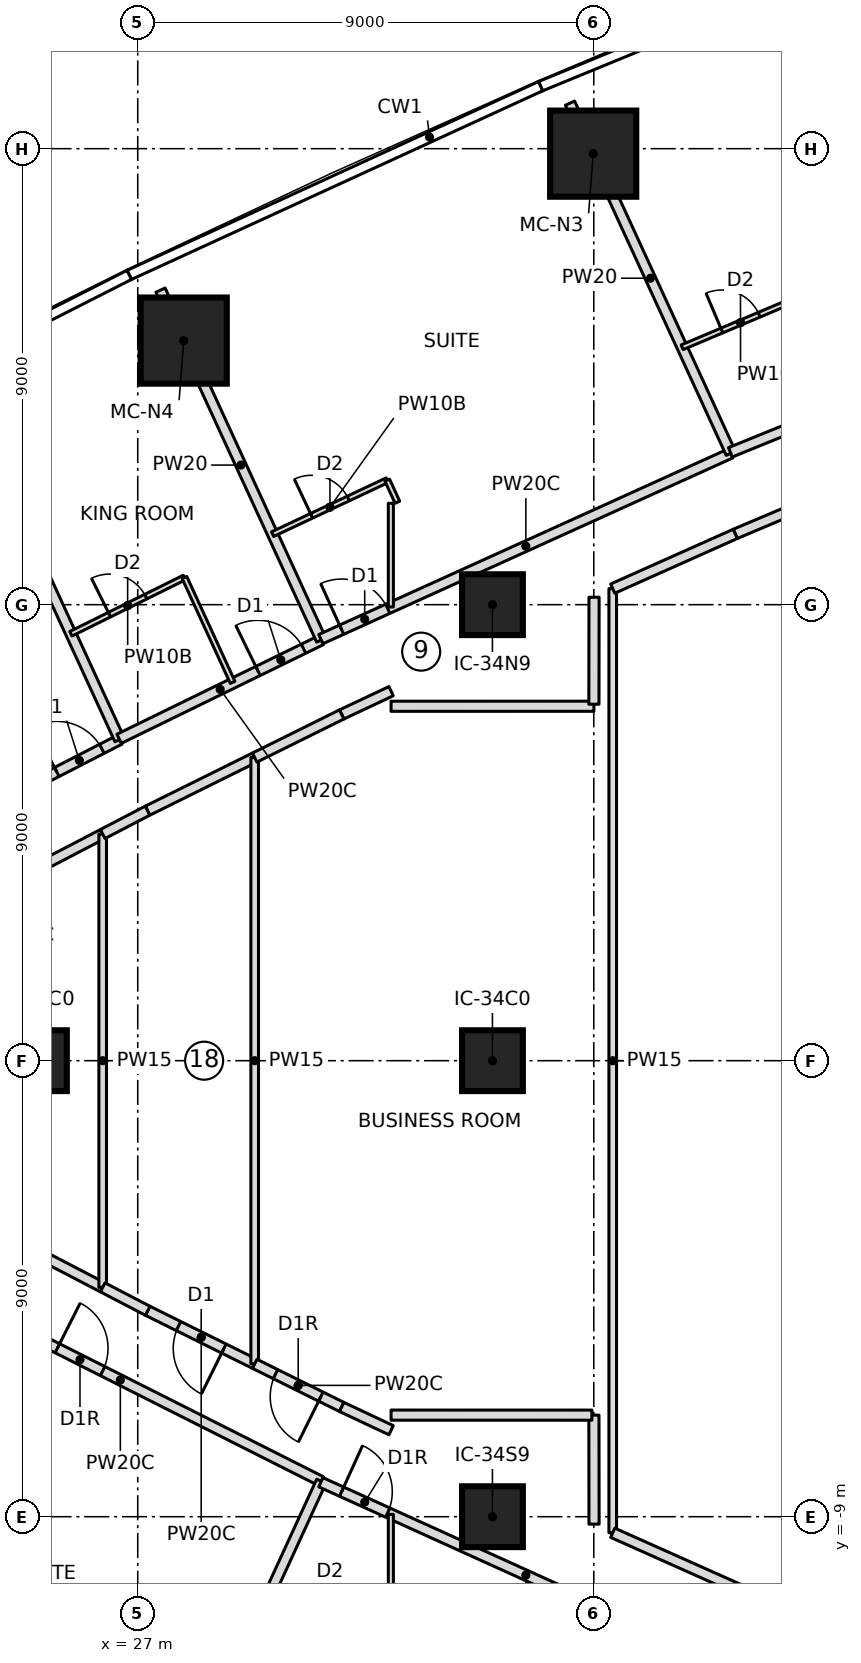
"""IFC4 building model, lengths in metres.
Left out: names, types, materials, properties, quantities, classifications, styles, units other than length and angle.
Written with IfcOpenShell. Run it as: python <this file> out.ifc"""

import sys

from ifc_helpers import new_model, si_unit, direction, frame, frame_2d, origin, origin_2d, place, context, subcontext, project, spatial, rectangle, extrude, element, fill, save


model = new_model("IFC4")
c1 = context("Model", 3, precision=1e-05, world=origin(), true_north=direction((0.0, 1.0)))
c2 = subcontext(c1, "Body", "Model", "MODEL_VIEW")
j1 = project(units=[si_unit("LENGTHUNIT", "METRE"), si_unit("PLANEANGLEUNIT", "RADIAN")], contexts=[c1])
p1 = place(None, origin())
s1 = spatial("IfcSite", under=j1, at=p1, CompositionType="ELEMENT")
p2 = place(p1, origin())
s2 = spatial("IfcBuilding", under=s1, at=p2, CompositionType="ELEMENT")
p3 = place(p2, frame((0.0, 0.0, 113.3)))
s3 = spatial("IfcBuildingStorey", under=s2, at=p3, CompositionType="ELEMENT", Elevation=113.3)
for number, where, z_axis, x_axis in (
    (1, (35.988, 17.902, 0.0), (0.0, 0.0, 1.0), (1.0, 0.0, 0.0)),
    (2, (27.907, 14.212, 0.0), (0.0, 0.0, 1.0), (1.0, 0.0, 0.0)),
):
    element("IfcColumn", number, at=place(p3, frame(where, z_axis=z_axis, x_axis=x_axis)), inside=s3, PredefinedType="COLUMN", context=c2, shape_type="SweptSolid", body=[
        extrude(rectangle(XDim=1.7, YDim=1.7, at=origin_2d()), origin(), (0.0, 0.0, 1.0), 3.55),
    ])
for number, where, z_axis, x_axis in (
    (3, (25.0, 0.0, 0.0), (0.0, 0.0, 1.0), (1.0, 0.0, 0.0)),
    (4, (34.0, -9.0, 0.0), (0.0, 0.0, 1.0), (1.0, 0.0, 0.0)),
    (5, (34.0, 0.0, 0.0), (0.0, 0.0, 1.0), (1.0, 0.0, 0.0)),
    (6, (34.0, 9.0, 0.0), (0.0, 0.0, 1.0), (1.0, 0.0, 0.0)),
):
    element("IfcColumn", number, at=place(p3, frame(where, z_axis=z_axis, x_axis=x_axis)), inside=s3, PredefinedType="COLUMN", context=c2, shape_type="SweptSolid", body=[
        extrude(rectangle(XDim=1.2, YDim=1.2, at=origin_2d()), origin(), (0.0, 0.0, 1.0), 3.55),
    ])
p4 = place(p3, frame((22.69, 4.302, 0.0), z_axis=(0.0, 0.0, 1.0), x_axis=(0.889236075961, 0.457448577667, 0.0)))
e7 = element("IfcWall", 7, at=p4, inside=s3, PredefinedType="PARTITIONING", context=c2, shape_type="SweptSolid", body=[
    extrude(rectangle(XDim=4.443, YDim=0.2, at=frame_2d((2.222, 0.0))), origin(), (0.0, 0.0, 1.0), 3.25),
])
p5 = place(p4, frame((3.05, 0.0, 0.0)))
e8 = element("IfcOpeningElement", 8, at=p5, cuts=e7, PredefinedType="OPENING", context=c2, shape_type="SweptSolid", body=[
    extrude(rectangle(XDim=1.0, YDim=2.1, at=frame_2d((0.5, 1.05))), frame((0.0, 0.11, 0.0), z_axis=(0.0, -1.0, 0.0), x_axis=(1.0, 0.0, 0.0)), (0.0, 0.0, 1.0), 0.22),
])
p6 = place(p3, frame((26.641, 6.335, 0.0), z_axis=(0.0, 0.0, 1.0), x_axis=(-0.417455028008, 0.908697584233, 0.0)))
e9 = element("IfcWall", 9, at=p6, inside=s3, PredefinedType="PARTITIONING", context=c2, shape_type="SweptSolid", body=[
    extrude(rectangle(XDim=7.603, YDim=0.2, at=frame_2d((3.802, 0.0))), origin(), (0.0, 0.0, 1.0), 3.25),
])
p7 = place(p3, frame((26.633, 6.353, 0.0), z_axis=(0.0, 0.0, 1.0), x_axis=(0.898502457097, 0.438968489291, 0.0)))
e10 = element("IfcWall", 10, at=p7, inside=s3, PredefinedType="PARTITIONING", context=c2, shape_type="SweptSolid", body=[
    extrude(rectangle(XDim=4.44, YDim=0.2, at=frame_2d((2.22, 0.0))), origin(), (0.0, 0.0, 1.0), 3.25),
])
p8 = place(p7, frame((3.05, 0.0, 0.0)))
e11 = element("IfcOpeningElement", 11, at=p8, cuts=e10, PredefinedType="OPENING", context=c2, shape_type="SweptSolid", body=[
    extrude(rectangle(XDim=1.0, YDim=2.1, at=frame_2d((0.5, 1.05))), frame((0.0, 0.11, 0.0), z_axis=(0.0, -1.0, 0.0), x_axis=(1.0, 0.0, 0.0)), (0.0, 0.0, 1.0), 0.22),
])
p9 = place(p3, frame((25.681, 8.426, 0.0), z_axis=(0.0, 0.0, 1.0), x_axis=(0.895944857815, 0.444165297784, 0.0)))
e12 = element("IfcWall", 12, at=p9, inside=s3, PredefinedType="PARTITIONING", context=c2, shape_type="SweptSolid", body=[
    extrude(rectangle(XDim=2.501, YDim=0.1, at=frame_2d((1.25, 0.0))), origin(), (0.0, 0.0, 1.0), 3.25),
])
p10 = place(p9, frame((0.85, 0.0, 0.0)))
e13 = element("IfcOpeningElement", 13, at=p10, cuts=e12, PredefinedType="OPENING", context=c2, shape_type="SweptSolid", body=[
    extrude(rectangle(XDim=0.8, YDim=2.1, at=frame_2d((0.4, 1.05))), frame((0.0, 0.06, 0.0), z_axis=(0.0, -1.0, 0.0), x_axis=(1.0, 0.0, 0.0)), (0.0, 0.0, 1.0), 0.12),
])
p11 = place(p3, frame((27.922, 9.537, 0.0), z_axis=(0.0, 0.0, 1.0), x_axis=(0.417433204355, -0.908707609686, 0.0)))
e14 = element("IfcWall", 14, at=p11, inside=s3, PredefinedType="PARTITIONING", context=c2, shape_type="SweptSolid", body=[
    extrude(rectangle(XDim=2.278, YDim=0.1, at=frame_2d((1.139, 0.0))), origin(), (0.0, 0.0, 1.0), 3.25),
])
p12 = place(p3, frame((30.622, 8.302, 0.0), z_axis=(0.0, 0.0, 1.0), x_axis=(-0.417429919618, 0.90870911859, 0.0)))
e15 = element("IfcWall", 15, at=p12, inside=s3, PredefinedType="PARTITIONING", context=c2, shape_type="SweptSolid", body=[
    extrude(rectangle(XDim=7.6, YDim=0.2, at=frame_2d((3.8, 0.0))), origin(), (0.0, 0.0, 1.0), 3.25),
])
p13 = place(p3, frame((30.614, 8.32, 0.0), z_axis=(0.0, 0.0, 1.0), x_axis=(0.910751030363, 0.41295588226, 0.0)))
e16 = element("IfcWall", 16, at=p13, inside=s3, PredefinedType="PARTITIONING", context=c2, shape_type="SweptSolid", body=[
    extrude(rectangle(XDim=8.883, YDim=0.2, at=frame_2d((4.442, 0.0))), origin(), (0.0, 0.0, 1.0), 3.25),
])
p14 = place(p13, frame((0.45, 0.0, 0.0)))
e17 = element("IfcOpeningElement", 17, at=p14, cuts=e16, PredefinedType="OPENING", context=c2, shape_type="SweptSolid", body=[
    extrude(rectangle(XDim=1.0, YDim=2.1, at=frame_2d((0.5, 1.05))), frame((0.0, 0.11, 0.0), z_axis=(0.0, -1.0, 0.0), x_axis=(1.0, 0.0, 0.0)), (0.0, 0.0, 1.0), 0.22),
])
p15 = place(p3, frame((29.662, 10.392, 0.0), z_axis=(0.0, 0.0, 1.0), x_axis=(0.904688082375, 0.426074493027, 0.0)))
e18 = element("IfcWall", 18, at=p15, inside=s3, PredefinedType="PARTITIONING", context=c2, shape_type="SweptSolid", body=[
    extrude(rectangle(XDim=2.5, YDim=0.1, at=frame_2d((1.25, 0.0))), origin(), (0.0, 0.0, 1.0), 3.25),
])
p16 = place(p15, frame((0.85, 0.0, 0.0)))
e19 = element("IfcOpeningElement", 19, at=p16, cuts=e18, PredefinedType="OPENING", context=c2, shape_type="SweptSolid", body=[
    extrude(rectangle(XDim=0.8, YDim=2.1, at=frame_2d((0.4, 1.05))), frame((0.0, 0.06, 0.0), z_axis=(0.0, -1.0, 0.0), x_axis=(1.0, 0.0, 0.0)), (0.0, 0.0, 1.0), 0.12),
])
p17 = place(p3, frame((31.924, 11.457, 0.0), z_axis=(0.0, 0.0, 1.0), x_axis=(0.4176025781, -0.908629785316, 0.0)))
e20 = element("IfcWall", 20, at=p17, inside=s3, PredefinedType="PARTITIONING", context=c2, shape_type="SweptSolid", body=[
    extrude(rectangle(XDim=0.479, YDim=0.1, at=frame_2d((0.239, 0.0))), origin(), (0.0, 0.0, 1.0), 3.25),
])
p18 = place(p3, frame((38.704, 11.989, 0.0), z_axis=(0.0, 0.0, 1.0), x_axis=(-0.417416334044, 0.908715359215, 0.0)))
e21 = element("IfcWall", 21, at=p18, inside=s3, PredefinedType="PARTITIONING", context=c2, shape_type="SweptSolid", body=[
    extrude(rectangle(XDim=7.604, YDim=0.2, at=frame_2d((3.802, 0.0))), origin(), (0.0, 0.0, 1.0), 3.25),
])
p19 = place(p3, frame((46.924, 15.357, 0.0), z_axis=(0.0, 0.0, 1.0), x_axis=(-0.926186929429, -0.377064678477, 0.0)))
e22 = element("IfcWall", 22, at=p19, inside=s3, PredefinedType="PARTITIONING", context=c2, shape_type="SweptSolid", body=[
    extrude(rectangle(XDim=8.884, YDim=0.2, at=frame_2d((4.442, 0.0))), origin(), (0.0, 0.0, 1.0), 3.25),
])
p20 = place(p19, frame((0.35, 0.0, 0.0)))
e23 = element("IfcOpeningElement", 23, at=p20, cuts=e22, PredefinedType="OPENING", context=c2, shape_type="SweptSolid", body=[
    extrude(rectangle(XDim=1.0, YDim=2.1, at=frame_2d((0.5, 1.05))), frame((0.0, 0.11, 0.0), z_axis=(0.0, -1.0, 0.0), x_axis=(1.0, 0.0, 0.0)), (0.0, 0.0, 1.0), 0.22),
])
p21 = place(p3, frame((37.744, 14.08, 0.0), z_axis=(0.0, 0.0, 1.0), x_axis=(0.921042675983, 0.38946166566, 0.0)))
e24 = element("IfcWall", 24, at=p21, inside=s3, PredefinedType="PARTITIONING", context=c2, shape_type="SweptSolid", body=[
    extrude(rectangle(XDim=2.501, YDim=0.1, at=frame_2d((1.25, 0.0))), origin(), (0.0, 0.0, 1.0), 3.25),
])
p22 = place(p21, frame((0.85, 0.0, 0.0)))
e25 = element("IfcOpeningElement", 25, at=p22, cuts=e24, PredefinedType="OPENING", context=c2, shape_type="SweptSolid", body=[
    extrude(rectangle(XDim=0.8, YDim=2.1, at=frame_2d((0.4, 1.05))), frame((0.0, 0.06, 0.0), z_axis=(0.0, -1.0, 0.0), x_axis=(1.0, 0.0, 0.0)), (0.0, 0.0, 1.0), 0.12),
])
p23 = place(p3, frame((22.69, -4.302, 0.0), z_axis=(0.0, 0.0, 1.0), x_axis=(0.892904919467, -0.450245271815, 0.0)))
e26 = element("IfcWall", 26, at=p23, inside=s3, PredefinedType="PARTITIONING", context=c2, shape_type="SweptSolid", body=[
    extrude(rectangle(XDim=8.883, YDim=0.2, at=frame_2d((4.441, 0.0))), origin(), (0.0, 0.0, 1.0), 3.25),
])
p24 = place(p23, frame((3.05, 0.0, 0.0)))
e27 = element("IfcOpeningElement", 27, at=p24, cuts=e26, PredefinedType="OPENING", context=c2, shape_type="SweptSolid", body=[
    extrude(rectangle(XDim=1.0, YDim=2.1, at=frame_2d((0.5, 1.05))), frame((0.0, 0.11, 0.0), z_axis=(0.0, -1.0, 0.0), x_axis=(1.0, 0.0, 0.0)), (0.0, 0.0, 1.0), 0.22),
])
p25 = place(p3, frame((27.449, -15.208, 0.0), z_axis=(0.0, 0.0, 1.0), x_axis=(0.417429919618, 0.90870911859, 0.0)))
e28 = element("IfcWall", 28, at=p25, inside=s3, PredefinedType="PARTITIONING", context=c2, shape_type="SweptSolid", body=[
    extrude(rectangle(XDim=7.6, YDim=0.2, at=frame_2d((3.8, 0.0))), origin(), (0.0, 0.0, 1.0), 3.25),
])
p26 = place(p3, frame((30.614, -8.32, 0.0), z_axis=(0.0, 0.0, 1.0), x_axis=(0.910751030363, -0.41295588226, 0.0)))
e29 = element("IfcWall", 29, at=p26, inside=s3, PredefinedType="PARTITIONING", context=c2, shape_type="SweptSolid", body=[
    extrude(rectangle(XDim=8.883, YDim=0.2, at=frame_2d((4.442, 0.0))), origin(), (0.0, 0.0, 1.0), 3.25),
])
p27 = place(p26, frame((0.45, 0.0, 0.0)))
e30 = element("IfcOpeningElement", 30, at=p27, cuts=e29, PredefinedType="OPENING", context=c2, shape_type="SweptSolid", body=[
    extrude(rectangle(XDim=1.0, YDim=2.1, at=frame_2d((0.5, 1.05))), frame((0.0, 0.11, 0.0), z_axis=(0.0, -1.0, 0.0), x_axis=(1.0, 0.0, 0.0)), (0.0, 0.0, 1.0), 0.22),
])
for number, where, z_axis, x_axis in (
    (31, (23.407, 2.962, 0.0), (0.0, 0.0, 1.0), (0.887, 0.462, 0.0)),
    (32, (26.308, -4.473, 0.0), (0.0, 0.0, 1.0), (-0.887, 0.462, 0.0)),
):
    element("IfcWall", number, at=place(p3, frame(where, z_axis=z_axis, x_axis=x_axis)), inside=s3, PredefinedType="PARTITIONING", context=c2, shape_type="SweptSolid", body=[
        extrude(rectangle(XDim=3.271, YDim=0.2, at=frame_2d((1.636, 0.0))), origin(), (0.0, 0.0, 1.0), 3.25),
    ])
p28 = place(p3, frame((26.308, -4.473, 0.0), z_axis=(0.0, 0.0, 1.0), x_axis=(0.0, 1.0, 0.0)))
e33 = element("IfcWall", 33, at=p28, inside=s3, PredefinedType="PARTITIONING", context=c2, shape_type="SweptSolid", body=[
    extrude(rectangle(XDim=8.946, YDim=0.15, at=frame_2d((4.473, 0.0))), origin(), (0.0, 0.0, 1.0), 3.25),
])
p29 = place(p3, frame((29.308, -5.983, 0.0), z_axis=(0.0, 0.0, 1.0), x_axis=(-0.895954899574, 0.444145041546, 0.0)))
e34 = element("IfcWall", 34, at=p29, inside=s3, PredefinedType="PARTITIONING", context=c2, shape_type="SweptSolid", body=[
    extrude(rectangle(XDim=2.357, YDim=0.2, at=frame_2d((1.179, 0.0))), origin(), (0.0, 0.0, 1.0), 3.25),
])
p30 = place(p29, frame((0.678, 0.0, 0.0)))
e35 = element("IfcOpeningElement", 35, at=p30, cuts=e34, PredefinedType="OPENING", context=c2, shape_type="SweptSolid", body=[
    extrude(rectangle(XDim=1.0, YDim=2.1, at=frame_2d((0.5, 1.05))), frame((0.0, 0.11, 0.0), z_axis=(0.0, -1.0, 0.0), x_axis=(1.0, 0.0, 0.0)), (0.0, 0.0, 1.0), 0.22),
])
for number, where, z_axis, x_axis in (
    (36, (27.196, -4.936, 0.0), (0.0, 0.0, 1.0), (-0.887, 0.462, 0.0)),
    (37, (26.308, 4.473, 0.0), (0.0, 0.0, 1.0), (0.887, 0.462, 0.0)),
):
    element("IfcWall", number, at=place(p3, frame(where, z_axis=z_axis, x_axis=x_axis)), inside=s3, PredefinedType="PARTITIONING", context=c2, shape_type="SweptSolid", body=[
        extrude(rectangle(XDim=1.001, YDim=0.2, at=frame_2d((0.501, 0.0))), origin(), (0.0, 0.0, 1.0), 3.25),
    ])
p31 = place(p3, frame((27.196, 4.936, 0.0), z_axis=(0.0, 0.0, 1.0), x_axis=(0.895954899574, 0.444145041546, 0.0)))
e38 = element("IfcWall", 38, at=p31, inside=s3, PredefinedType="PARTITIONING", context=c2, shape_type="SweptSolid", body=[
    extrude(rectangle(XDim=2.357, YDim=0.2, at=frame_2d((1.179, 0.0))), origin(), (0.0, 0.0, 1.0), 3.25),
])
p32 = place(p3, frame((29.308, -5.983, 0.0), z_axis=(0.0, 0.0, 1.0), x_axis=(0.0, 1.0, 0.0)))
e39 = element("IfcWall", 39, at=p32, inside=s3, PredefinedType="PARTITIONING", context=c2, shape_type="SweptSolid", body=[
    extrude(rectangle(XDim=11.965, YDim=0.15, at=frame_2d((5.983, 0.0))), origin(), (0.0, 0.0, 1.0), 3.25),
])
p33 = place(p3, frame((31.025, -6.833, 0.0), z_axis=(0.0, 0.0, 1.0), x_axis=(-0.896001589052, 0.444050844404, 0.0)))
e40 = element("IfcWall", 40, at=p33, inside=s3, PredefinedType="PARTITIONING", context=c2, shape_type="SweptSolid", body=[
    extrude(rectangle(XDim=1.916, YDim=0.2, at=frame_2d((0.958, 0.0))), origin(), (0.0, 0.0, 1.0), 3.25),
])
p34 = place(p33, frame((0.458, 0.0, 0.0)))
e41 = element("IfcOpeningElement", 41, at=p34, cuts=e40, PredefinedType="OPENING", context=c2, shape_type="SweptSolid", body=[
    extrude(rectangle(XDim=1.0, YDim=2.1, at=frame_2d((0.5, 1.05))), frame((0.0, 0.11, 0.0), z_axis=(0.0, -1.0, 0.0), x_axis=(1.0, 0.0, 0.0)), (0.0, 0.0, 1.0), 0.22),
])
for number, where, z_axis, x_axis in (
    (42, (31.025, 6.833, 0.0), (0.0, 0.0, 1.0), (0.905, 0.426, 0.0)),
    (43, (32.0, -7.293, 0.0), (0.0, 0.0, 1.0), (-0.905, 0.426, 0.0)),
):
    element("IfcWall", number, at=place(p3, frame(where, z_axis=z_axis, x_axis=x_axis)), inside=s3, PredefinedType="PARTITIONING", context=c2, shape_type="SweptSolid", body=[
        extrude(rectangle(XDim=1.078, YDim=0.2, at=frame_2d((0.539, 0.0))), origin(), (0.0, 0.0, 1.0), 3.25),
    ])
p35 = place(p3, frame((29.308, 5.983, 0.0), z_axis=(0.0, 0.0, 1.0), x_axis=(0.896001589052, 0.444050844404, 0.0)))
e44 = element("IfcWall", 44, at=p35, inside=s3, PredefinedType="PARTITIONING", context=c2, shape_type="SweptSolid", body=[
    extrude(rectangle(XDim=1.916, YDim=0.2, at=frame_2d((0.958, 0.0))), origin(), (0.0, 0.0, 1.0), 3.25),
])
p36 = place(p3, frame((36.374, -9.317, 0.0), z_axis=(0.0, 0.0, 1.0), x_axis=(0.0, 1.0, 0.0)))
e45 = element("IfcWall", 45, at=p36, inside=s3, PredefinedType="PARTITIONING", context=c2, shape_type="SweptSolid", body=[
    extrude(rectangle(XDim=18.634, YDim=0.15, at=frame_2d((9.317, 0.0))), origin(), (0.0, 0.0, 1.0), 3.25),
])
p37 = place(p3, frame((38.792, 10.397, 0.0), z_axis=(0.0, 0.0, 1.0), x_axis=(0.921037415532, 0.389474105929, 0.0)))
e46 = element("IfcWall", 46, at=p37, inside=s3, PredefinedType="PARTITIONING", context=c2, shape_type="SweptSolid", body=[
    extrude(rectangle(XDim=4.273, YDim=0.2, at=frame_2d((2.137, 0.0))), origin(), (0.0, 0.0, 1.0), 3.25),
])
p38 = place(p37, frame((1.636, 0.0, 0.0)))
e47 = element("IfcOpeningElement", 47, at=p38, cuts=e46, PredefinedType="OPENING", context=c2, shape_type="SweptSolid", body=[
    extrude(rectangle(XDim=1.5, YDim=2.1, at=frame_2d((0.75, 1.05))), frame((0.0, 0.11, 0.0), z_axis=(0.0, -1.0, 0.0), x_axis=(1.0, 0.0, 0.0)), (0.0, 0.0, 1.0), 0.22),
])
p39 = place(p3, frame((42.728, -12.062, 0.0), z_axis=(0.0, 0.0, 1.0), x_axis=(-0.921037415532, 0.389474105929, 0.0)))
e48 = element("IfcWall", 48, at=p39, inside=s3, PredefinedType="PARTITIONING", context=c2, shape_type="SweptSolid", body=[
    extrude(rectangle(XDim=4.273, YDim=0.2, at=frame_2d((2.137, 0.0))), origin(), (0.0, 0.0, 1.0), 3.25),
])
for number, where, z_axis, x_axis in (
    (49, (38.792, -10.397, 0.0), (0.0, 0.0, 1.0), (-0.913, 0.408, 0.0)),
    (50, (36.374, 9.317, 0.0), (0.0, 0.0, 1.0), (0.913, 0.408, 0.0)),
):
    element("IfcWall", number, at=place(p3, frame(where, z_axis=z_axis, x_axis=x_axis)), inside=s3, PredefinedType="PARTITIONING", context=c2, shape_type="SweptSolid", body=[
        extrude(rectangle(XDim=2.648, YDim=0.2, at=frame_2d((1.324, 0.0))), origin(), (0.0, 0.0, 1.0), 3.25),
    ])
for number, where, z_axis, x_axis in (
    (51, (31.995, 11.0, 0.0), (0.0, 0.0, 1.0), (0.0, -1.0, 0.0)),
    (52, (31.995, -8.954, 0.0), (0.0, 0.0, 1.0), (0.0, -1.0, 0.0)),
):
    element("IfcWall", number, at=place(p3, frame(where, z_axis=z_axis, x_axis=x_axis)), inside=s3, PredefinedType="PARTITIONING", context=c2, shape_type="SweptSolid", body=[
        extrude(rectangle(XDim=2.046, YDim=0.1, at=frame_2d((1.023, 0.0))), origin(), (0.0, 0.0, 1.0), 3.25),
    ])
p40 = place(p3, frame((36.005, -9.146, 0.0), z_axis=(0.0, 0.0, 1.0), x_axis=(-0.001135073049, 0.999999355804, 0.0)))
e53 = element("IfcWall", 53, at=p40, inside=s3, PredefinedType="PARTITIONING", context=c2, shape_type="SweptSolid", body=[
    extrude(rectangle(XDim=2.151, YDim=0.2, at=frame_2d((1.075, 0.0))), origin(), (0.0, 0.0, 1.0), 3.25),
])
p41 = place(p3, frame((35.962, -6.996, 0.0), z_axis=(0.0, 0.0, 1.0), x_axis=(-0.999999992409, 0.000123213405, 0.0)))
e54 = element("IfcWall", 54, at=p41, inside=s3, PredefinedType="PARTITIONING", context=c2, shape_type="SweptSolid", body=[
    extrude(rectangle(XDim=3.963, YDim=0.2, at=frame_2d((1.981, 0.0))), origin(), (0.0, 0.0, 1.0), 3.25),
])
p42 = place(p3, frame((32.0, 6.995, 0.0), z_axis=(0.0, 0.0, 1.0), x_axis=(0.99999999256, 0.00012198097, 0.0)))
e55 = element("IfcWall", 55, at=p42, inside=s3, PredefinedType="PARTITIONING", context=c2, shape_type="SweptSolid", body=[
    extrude(rectangle(XDim=4.003, YDim=0.2, at=frame_2d((2.001, 0.0))), origin(), (0.0, 0.0, 1.0), 3.25),
])
p43 = place(p3, frame((36.002, 7.036, 0.0), z_axis=(0.0, 0.0, 1.0), x_axis=(0.001156603436, 0.999999331134, 0.0)))
e56 = element("IfcWall", 56, at=p43, inside=s3, PredefinedType="PARTITIONING", context=c2, shape_type="SweptSolid", body=[
    extrude(rectangle(XDim=2.111, YDim=0.2, at=frame_2d((1.055, 0.0))), origin(), (0.0, 0.0, 1.0), 3.25),
])
p44 = place(p5, origin())
e57 = element("IfcDoor", 57, at=p44, inside=s3, OperationType="SINGLE_SWING_LEFT", PredefinedType="DOOR", context=c2, shape_type="SweptSolid", body=[
    extrude(rectangle(XDim=1.0, YDim=2.1, at=frame_2d((0.5, 1.05))), frame((0.0, 0.025, 0.0), z_axis=(0.0, -1.0, 0.0), x_axis=(1.0, 0.0, 0.0)), (0.0, 0.0, 1.0), 0.05),
])
fill(e8, e57)
p45 = place(p10, origin())
e58 = element("IfcDoor", 58, at=p45, inside=s3, OperationType="SINGLE_SWING_LEFT", PredefinedType="DOOR", context=c2, shape_type="SweptSolid", body=[
    extrude(rectangle(XDim=0.8, YDim=2.1, at=frame_2d((0.4, 1.05))), frame((0.0, 0.025, 0.0), z_axis=(0.0, -1.0, 0.0), x_axis=(1.0, 0.0, 0.0)), (0.0, 0.0, 1.0), 0.05),
])
fill(e13, e58)
p46 = place(p8, origin())
e59 = element("IfcDoor", 59, at=p46, inside=s3, OperationType="SINGLE_SWING_LEFT", PredefinedType="DOOR", context=c2, shape_type="SweptSolid", body=[
    extrude(rectangle(XDim=1.0, YDim=2.1, at=frame_2d((0.5, 1.05))), frame((0.0, 0.025, 0.0), z_axis=(0.0, -1.0, 0.0), x_axis=(1.0, 0.0, 0.0)), (0.0, 0.0, 1.0), 0.05),
])
fill(e11, e59)
p47 = place(p16, origin())
e60 = element("IfcDoor", 60, at=p47, inside=s3, OperationType="SINGLE_SWING_LEFT", PredefinedType="DOOR", context=c2, shape_type="SweptSolid", body=[
    extrude(rectangle(XDim=0.8, YDim=2.1, at=frame_2d((0.4, 1.05))), frame((0.0, 0.025, 0.0), z_axis=(0.0, -1.0, 0.0), x_axis=(1.0, 0.0, 0.0)), (0.0, 0.0, 1.0), 0.05),
])
fill(e19, e60)
p48 = place(p14, origin())
e61 = element("IfcDoor", 61, at=p48, inside=s3, OperationType="SINGLE_SWING_LEFT", PredefinedType="DOOR", context=c2, shape_type="SweptSolid", body=[
    extrude(rectangle(XDim=1.0, YDim=2.1, at=frame_2d((0.5, 1.05))), frame((0.0, 0.025, 0.0), z_axis=(0.0, -1.0, 0.0), x_axis=(1.0, 0.0, 0.0)), (0.0, 0.0, 1.0), 0.05),
])
fill(e17, e61)
p49 = place(p22, origin())
e62 = element("IfcDoor", 62, at=p49, inside=s3, OperationType="SINGLE_SWING_LEFT", PredefinedType="DOOR", context=c2, shape_type="SweptSolid", body=[
    extrude(rectangle(XDim=0.8, YDim=2.1, at=frame_2d((0.4, 1.05))), frame((0.0, 0.025, 0.0), z_axis=(0.0, -1.0, 0.0), x_axis=(1.0, 0.0, 0.0)), (0.0, 0.0, 1.0), 0.05),
])
fill(e25, e62)
p50 = place(p24, origin())
e63 = element("IfcDoor", 63, at=p50, inside=s3, OperationType="SINGLE_SWING_RIGHT", PredefinedType="DOOR", context=c2, shape_type="SweptSolid", body=[
    extrude(rectangle(XDim=1.0, YDim=2.1, at=frame_2d((0.5, 1.05))), frame((0.0, 0.025, 0.0), z_axis=(0.0, -1.0, 0.0), x_axis=(1.0, 0.0, 0.0)), (0.0, 0.0, 1.0), 0.05),
])
fill(e27, e63)
p51 = place(p27, origin())
e64 = element("IfcDoor", 64, at=p51, inside=s3, OperationType="SINGLE_SWING_RIGHT", PredefinedType="DOOR", context=c2, shape_type="SweptSolid", body=[
    extrude(rectangle(XDim=1.0, YDim=2.1, at=frame_2d((0.5, 1.05))), frame((0.0, 0.025, 0.0), z_axis=(0.0, -1.0, 0.0), x_axis=(1.0, 0.0, 0.0)), (0.0, 0.0, 1.0), 0.05),
])
fill(e30, e64)
p52 = place(p30, origin())
e65 = element("IfcDoor", 65, at=p52, inside=s3, OperationType="SINGLE_SWING_LEFT", PredefinedType="DOOR", context=c2, shape_type="SweptSolid", body=[
    extrude(rectangle(XDim=1.0, YDim=2.1, at=frame_2d((0.5, 1.05))), frame((0.0, 0.025, 0.0), z_axis=(0.0, -1.0, 0.0), x_axis=(1.0, 0.0, 0.0)), (0.0, 0.0, 1.0), 0.05),
])
fill(e35, e65)
p53 = place(p34, origin())
e66 = element("IfcDoor", 66, at=p53, inside=s3, OperationType="SINGLE_SWING_RIGHT", PredefinedType="DOOR", context=c2, shape_type="SweptSolid", body=[
    extrude(rectangle(XDim=1.0, YDim=2.1, at=frame_2d((0.5, 1.05))), frame((0.0, 0.025, 0.0), z_axis=(0.0, -1.0, 0.0), x_axis=(1.0, 0.0, 0.0)), (0.0, 0.0, 1.0), 0.05),
])
fill(e41, e66)
save(model, sys.argv[1])
